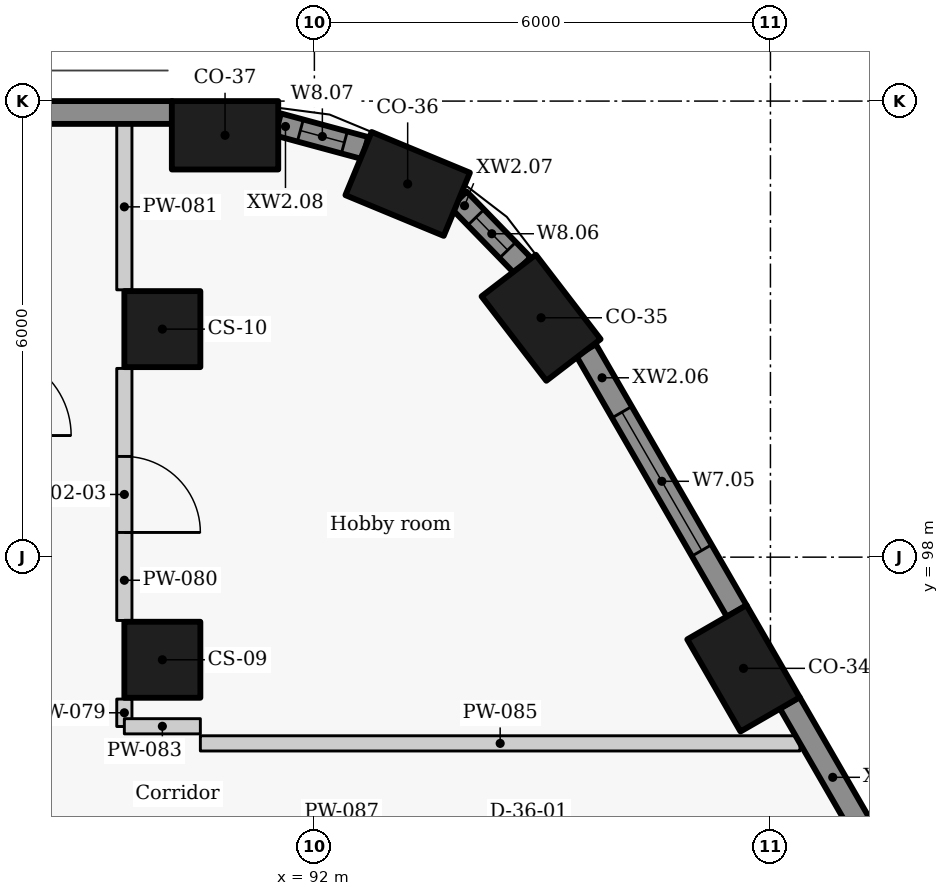
"""IFC4 building model, lengths in metres.
Left out: names, types, materials, properties, quantities, classifications, styles, units other than length and angle.
Written with IfcOpenShell. Run it as: python <this file> out.ifc"""

import sys

from ifc_helpers import new_model, si_unit, direction, frame, frame_2d, origin, origin_2d, place, context, subcontext, project, spatial, rectangle, extrude, element, fill, save


model = new_model("IFC4")
c1 = context("Model", 3, precision=1e-05, world=origin(), true_north=direction((0.0, 1.0)))
c2 = subcontext(c1, "Body", "Model", "MODEL_VIEW")
j1 = project(units=[si_unit("LENGTHUNIT", "METRE"), si_unit("PLANEANGLEUNIT", "RADIAN")], contexts=[c1])
p1 = place(None, origin())
s1 = spatial("IfcSite", under=j1, at=p1, CompositionType="ELEMENT")
p2 = place(p1, origin())
s2 = spatial("IfcBuilding", under=s1, at=p2, CompositionType="ELEMENT")
p3 = place(p2, frame((0.0, 0.0, 117.3)))
s3 = spatial("IfcBuildingStorey", under=s2, at=p3, CompositionType="ELEMENT", Elevation=117.3)
for number, where, z_axis, x_axis in (
    (1, (97.646, 96.537, 0.0), (0.0, 0.0, 1.0), (-0.5, 0.866, 0.0)),
    (2, (94.982, 101.149, 0.0), (0.0, 0.0, 1.0), (-0.609, 0.793, 0.0)),
    (3, (93.227, 102.91, 0.0), (0.0, 0.0, 1.0), (-0.924, 0.383, 0.0)),
    (4, (90.825, 103.55, 0.0), (0.0, 0.0, 1.0), (-1.0, 0.0, 0.0)),
):
    element("IfcColumn", number, at=place(p3, frame(where, z_axis=z_axis, x_axis=x_axis)), inside=s3, PredefinedType="COLUMN", context=c2, shape_type="SweptSolid", body=[
        extrude(rectangle(XDim=1.4, YDim=0.9, at=origin_2d()), origin(), (0.0, 0.0, 1.0), 3.3),
    ])
for number, where, z_axis, x_axis in (
    (5, (90.0, 96.65, 0.0), (0.0, 0.0, 1.0), (0.0, 1.0, 0.0)),
    (6, (90.0, 101.0, 0.0), (0.0, 0.0, 1.0), (0.0, 1.0, 0.0)),
):
    element("IfcColumn", number, at=place(p3, frame(where, z_axis=z_axis, x_axis=x_axis)), inside=s3, PredefinedType="COLUMN", context=c2, shape_type="SweptSolid", body=[
        extrude(rectangle(XDim=1.0, YDim=1.0, at=origin_2d()), origin(), (0.0, 0.0, 1.0), 3.3),
    ])
p4 = place(p3, frame((100.22, 92.677, 0.0), z_axis=(0.0, 0.0, 1.0), x_axis=(-0.499957037901, 0.866050206543, 0.0)))
e7 = element("IfcWall", 7, at=p4, inside=s3, PredefinedType="SOLIDWALL", context=c2, shape_type="SweptSolid", body=[
    extrude(rectangle(XDim=3.934, YDim=0.3, at=frame_2d((1.967, 0.0))), origin(), (0.0, 0.0, 1.0), 2.05),
])
p5 = place(p4, frame((0.369, 0.0, 0.9)))
e8 = element("IfcOpeningElement", 8, at=p5, cuts=e7, PredefinedType="OPENING", context=c2, shape_type="SweptSolid", body=[
    extrude(rectangle(XDim=1.2, YDim=1.1, at=frame_2d((0.6, 0.55))), frame((0.0, 0.16, 0.0), z_axis=(0.0, -1.0, 0.0), x_axis=(1.0, 0.0, 0.0)), (0.0, 0.0, 1.0), 0.32),
])
p6 = place(p3, frame((97.557, 97.29, 0.0), z_axis=(0.0, 0.0, 1.0), x_axis=(-0.500043828347, 0.866000097998, 0.0)))
e9 = element("IfcWall", 9, at=p6, inside=s3, PredefinedType="SOLIDWALL", context=c2, shape_type="SweptSolid", body=[
    extrude(rectangle(XDim=3.968, YDim=0.3, at=frame_2d((1.984, 0.0))), origin(), (0.0, 0.0, 1.0), 2.05),
])
p7 = place(p6, frame((0.922, 0.0, 0.9)))
e10 = element("IfcOpeningElement", 10, at=p7, cuts=e9, PredefinedType="OPENING", context=c2, shape_type="SweptSolid", body=[
    extrude(rectangle(XDim=2.1, YDim=1.1, at=frame_2d((1.05, 0.55))), frame((0.0, 0.16, 0.0), z_axis=(0.0, -1.0, 0.0), x_axis=(1.0, 0.0, 0.0)), (0.0, 0.0, 1.0), 0.32),
])
p8 = place(p3, frame((94.738, 101.839, 0.0), z_axis=(0.0, 0.0, 1.0), x_axis=(-0.697032216592, 0.717039809936, 0.0)))
e11 = element("IfcWall", 11, at=p8, inside=s3, PredefinedType="SOLIDWALL", context=c2, shape_type="SweptSolid", body=[
    extrude(rectangle(XDim=1.208, YDim=0.3, at=frame_2d((0.604, 0.0))), origin(), (0.0, 0.0, 1.0), 2.05),
])
p9 = place(p8, frame((0.279, 0.0, 0.9)))
e12 = element("IfcOpeningElement", 12, at=p9, cuts=e11, PredefinedType="OPENING", context=c2, shape_type="SweptSolid", body=[
    extrude(rectangle(XDim=0.6, YDim=1.1, at=frame_2d((0.3, 0.55))), frame((0.0, 0.16, 0.0), z_axis=(0.0, -1.0, 0.0), x_axis=(1.0, 0.0, 0.0)), (0.0, 0.0, 1.0), 0.32),
])
p10 = place(p3, frame((92.669, 103.382, 0.0), z_axis=(0.0, 0.0, 1.0), x_axis=(-0.965278131029, 0.261224290136, 0.0)))
e13 = element("IfcWall", 13, at=p10, inside=s3, PredefinedType="SOLIDWALL", context=c2, shape_type="SweptSolid", body=[
    extrude(rectangle(XDim=1.19, YDim=0.3, at=frame_2d((0.595, 0.0))), origin(), (0.0, 0.0, 1.0), 2.05),
])
p11 = place(p10, frame((0.285, 0.0, 0.9)))
e14 = element("IfcOpeningElement", 14, at=p11, cuts=e13, PredefinedType="OPENING", context=c2, shape_type="SweptSolid", body=[
    extrude(rectangle(XDim=0.6, YDim=1.1, at=frame_2d((0.3, 0.55))), frame((0.0, 0.16, 0.0), z_axis=(0.0, -1.0, 0.0), x_axis=(1.0, 0.0, 0.0)), (0.0, 0.0, 1.0), 0.32),
])
p12 = place(p3, frame((90.129, 103.85, 0.0), z_axis=(0.0, 0.0, 1.0), x_axis=(-1.0, 0.0, 0.0)))
e15 = element("IfcWall", 15, at=p12, inside=s3, PredefinedType="SOLIDWALL", context=c2, shape_type="SweptSolid", body=[
    extrude(rectangle(XDim=20.291, YDim=0.3, at=frame_2d((10.146, 0.0))), origin(), (0.0, 0.0, 1.0), 2.05),
])
p13 = place(p3, frame((89.5, 95.772, 0.0), z_axis=(0.0, 0.0, 1.0), x_axis=(0.0, 1.0, 0.0)))
e16 = element("IfcWall", 16, at=p13, inside=s3, PredefinedType="PARTITIONING", context=c2, shape_type="SweptSolid", body=[
    extrude(rectangle(XDim=0.361, YDim=0.2, at=frame_2d((0.181, 0.0))), origin(), (0.0, 0.0, 1.0), 2.95),
])
p14 = place(p3, frame((89.5, 100.483, 0.0), z_axis=(0.0, 0.0, 1.0), x_axis=(0.0, -1.0, 0.0)))
e17 = element("IfcWall", 17, at=p14, inside=s3, PredefinedType="PARTITIONING", context=c2, shape_type="SweptSolid", body=[
    extrude(rectangle(XDim=3.316, YDim=0.2, at=frame_2d((1.658, 0.0))), origin(), (0.0, 0.0, 1.0), 2.95),
])
p15 = place(p14, frame((1.158, 0.0, 0.0)))
e18 = element("IfcOpeningElement", 18, at=p15, cuts=e17, PredefinedType="OPENING", context=c2, shape_type="SweptSolid", body=[
    extrude(rectangle(XDim=1.0, YDim=2.1, at=frame_2d((0.5, 1.05))), frame((0.0, 0.11, 0.0), z_axis=(0.0, -1.0, 0.0), x_axis=(1.0, 0.0, 0.0)), (0.0, 0.0, 1.0), 0.22),
])
p16 = place(p3, frame((89.5, 101.517, 0.0), z_axis=(0.0, 0.0, 1.0), x_axis=(0.0, 1.0, 0.0)))
e19 = element("IfcWall", 19, at=p16, inside=s3, PredefinedType="PARTITIONING", context=c2, shape_type="SweptSolid", body=[
    extrude(rectangle(XDim=2.183, YDim=0.2, at=frame_2d((1.091, 0.0))), origin(), (0.0, 0.0, 1.0), 2.95),
])
p17 = place(p3, frame((89.5, 95.775, 0.0), z_axis=(0.0, 0.0, 1.0), x_axis=(1.0, 0.0, 0.0)))
e20 = element("IfcWall", 20, at=p17, inside=s3, PredefinedType="PARTITIONING", context=c2, shape_type="SweptSolid", body=[
    extrude(rectangle(XDim=1.0, YDim=0.2, at=frame_2d((0.5, 0.0))), origin(), (0.0, 0.0, 1.0), 2.43),
])
p18 = place(p3, frame((90.5, 95.55, 0.0), z_axis=(0.0, 0.0, 1.0), x_axis=(1.0, 0.0, 0.0)))
e21 = element("IfcWall", 21, at=p18, inside=s3, PredefinedType="PARTITIONING", context=c2, shape_type="SweptSolid", body=[
    extrude(rectangle(XDim=7.889, YDim=0.2, at=frame_2d((3.944, 0.0))), origin(), (0.0, 0.0, 1.0), 2.03),
])
p19 = place(p7, origin())
e22 = element("IfcWindow", 22, at=p19, inside=s3, PartitioningType="SINGLE_PANEL", PredefinedType="WINDOW", context=c2, shape_type="SweptSolid", body=[
    extrude(rectangle(XDim=2.1, YDim=1.1, at=frame_2d((1.05, 0.55))), frame((0.0, 0.03, 0.0), z_axis=(0.0, -1.0, 0.0), x_axis=(1.0, 0.0, 0.0)), (0.0, 0.0, 1.0), 0.06),
])
fill(e10, e22)
p20 = place(p9, origin())
e23 = element("IfcWindow", 23, at=p20, inside=s3, PartitioningType="SINGLE_PANEL", PredefinedType="WINDOW", context=c2, shape_type="SweptSolid", body=[
    extrude(rectangle(XDim=0.6, YDim=1.1, at=frame_2d((0.3, 0.55))), frame((0.0, 0.03, 0.0), z_axis=(0.0, -1.0, 0.0), x_axis=(1.0, 0.0, 0.0)), (0.0, 0.0, 1.0), 0.06),
])
fill(e12, e23)
p21 = place(p11, origin())
e24 = element("IfcWindow", 24, at=p21, inside=s3, PartitioningType="SINGLE_PANEL", PredefinedType="WINDOW", context=c2, shape_type="SweptSolid", body=[
    extrude(rectangle(XDim=0.6, YDim=1.1, at=frame_2d((0.3, 0.55))), frame((0.0, 0.03, 0.0), z_axis=(0.0, -1.0, 0.0), x_axis=(1.0, 0.0, 0.0)), (0.0, 0.0, 1.0), 0.06),
])
fill(e14, e24)
p22 = place(p15, origin())
e25 = element("IfcDoor", 25, at=p22, inside=s3, OperationType="SINGLE_SWING_RIGHT", PredefinedType="DOOR", context=c2, shape_type="SweptSolid", body=[
    extrude(rectangle(XDim=1.0, YDim=2.1, at=frame_2d((0.5, 1.05))), frame((0.0, 0.025, 0.0), z_axis=(0.0, -1.0, 0.0), x_axis=(1.0, 0.0, 0.0)), (0.0, 0.0, 1.0), 0.05),
])
fill(e18, e25)
save(model, sys.argv[1])
